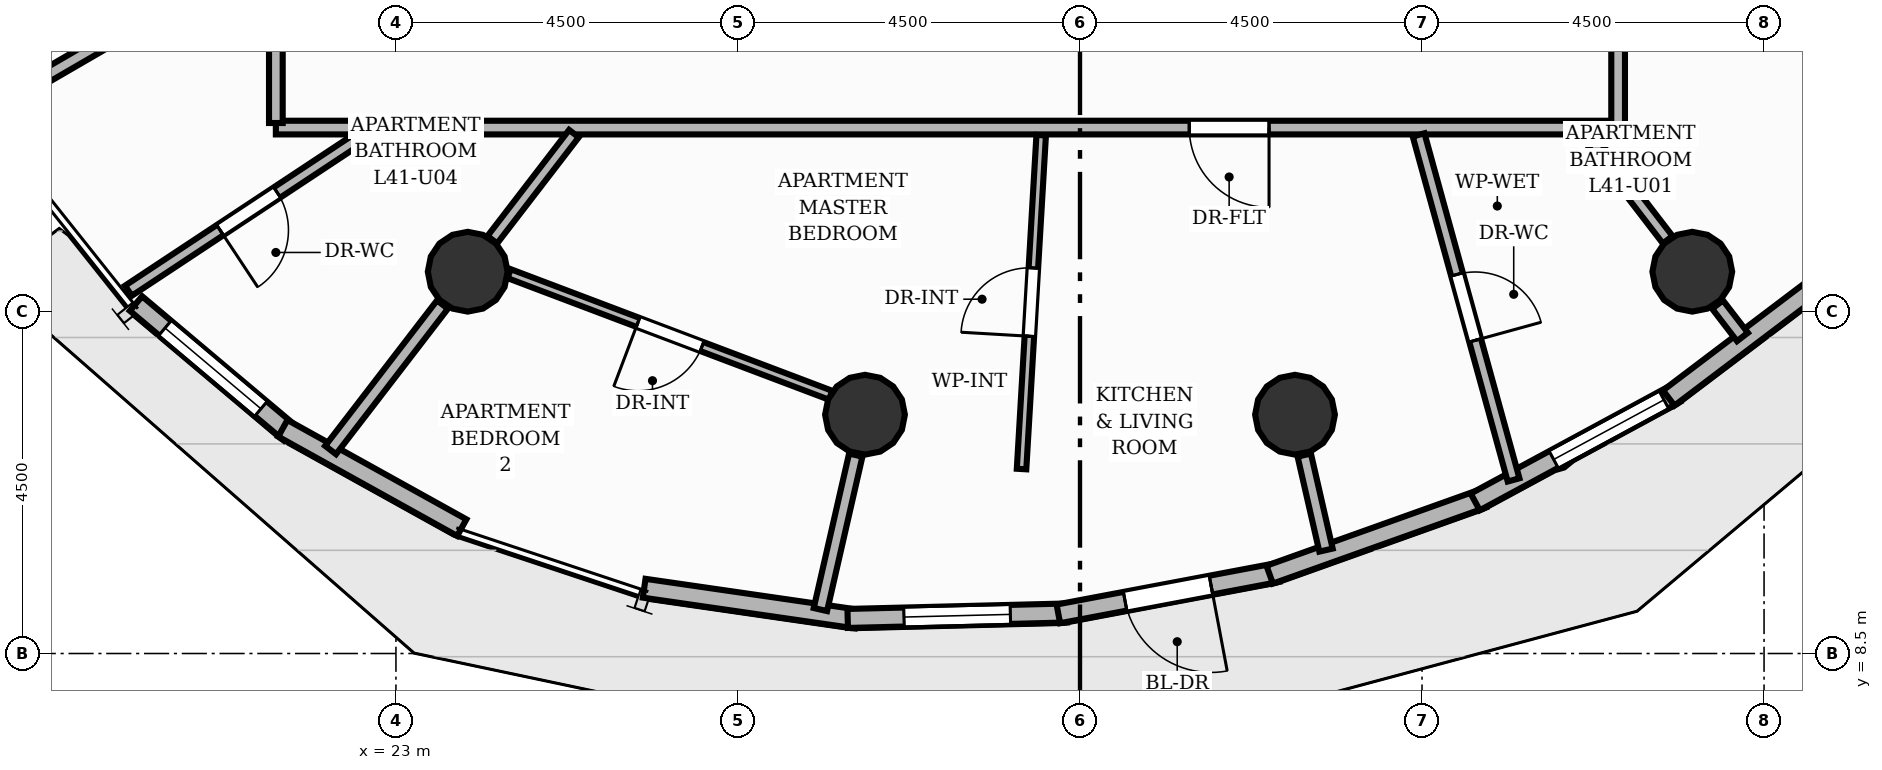
"""IFC4 building model, lengths in metres.
Left out: names, types, materials, properties, quantities, classifications, styles, units other than length and angle.
Written with IfcOpenShell. Run it as: python <this file> out.ifc"""

import sys

from ifc_helpers import new_model, si_unit, direction, frame, frame_2d, origin, origin_2d, place, context, subcontext, project, spatial, rectangle, circle, extrude, element, fill, save


model = new_model("IFC4")
c1 = context("Model", 3, precision=1e-05, world=origin(), true_north=direction((0.0, 1.0)))
c2 = subcontext(c1, "Body", "Model", "MODEL_VIEW")
j1 = project(units=[si_unit("LENGTHUNIT", "METRE"), si_unit("PLANEANGLEUNIT", "RADIAN")], contexts=[c1])
p1 = place(None, origin())
s1 = spatial("IfcSite", under=j1, at=p1, CompositionType="ELEMENT")
p2 = place(p1, origin())
s2 = spatial("IfcBuilding", under=s1, at=p2, CompositionType="ELEMENT")
p3 = place(p2, frame((0.0, 0.0, 139.36)))
s3 = spatial("IfcBuildingStorey", under=s2, at=p3, CompositionType="ELEMENT", Elevation=139.36)
for number, where, z_axis, x_axis in (
    (1, (23.944, 13.523, 0.0), (0.0, 0.0, 1.0), (1.0, 0.0, 0.0)),
    (2, (29.171, 11.642, 0.0), (0.0, 0.0, 1.0), (1.0, 0.0, 0.0)),
    (3, (34.829, 11.642, 0.0), (0.0, 0.0, 1.0), (1.0, 0.0, 0.0)),
    (4, (40.056, 13.523, 0.0), (0.0, 0.0, 1.0), (1.0, 0.0, 0.0)),
):
    element("IfcColumn", number, at=place(p3, frame(where, z_axis=z_axis, x_axis=x_axis)), inside=s3, PredefinedType="COLUMN", context=c2, shape_type="SweptSolid", body=[
        extrude(circle(Radius=0.525, at=origin_2d()), origin(), (0.0, 0.0, 1.0), 3.2),
    ])
p4 = place(p3, frame((21.605, 11.399, 0.0), z_axis=(0.0, 0.0, 1.0), x_axis=(-0.764825125467, 0.644237943197, 0.0)))
e5 = element("IfcWall", 5, at=p4, inside=s3, PredefinedType="SOLIDWALL", context=c2, shape_type="SweptSolid", body=[
    extrude(rectangle(XDim=2.648, YDim=0.25, at=frame_2d((1.324, 0.0))), origin(), (0.0, 0.0, 1.0), 2.96),
])
p5 = place(p4, frame((0.499, 0.0, 0.85)))
e6 = element("IfcOpeningElement", 6, at=p5, cuts=e5, PredefinedType="OPENING", context=c2, shape_type="SweptSolid", body=[
    extrude(rectangle(XDim=1.65, YDim=1.55, at=frame_2d((0.825, 0.775))), frame((0.0, 0.135, 0.0), z_axis=(0.0, -1.0, 0.0), x_axis=(1.0, 0.0, 0.0)), (0.0, 0.0, 1.0), 0.27),
])
p6 = place(p3, frame((23.866, 10.156, 0.0), z_axis=(0.0, 0.0, 1.0), x_axis=(-0.874341102682, 0.485311895755, 0.0)))
e7 = element("IfcWall", 7, at=p6, inside=s3, PredefinedType="SOLIDWALL", context=c2, shape_type="SweptSolid", body=[
    extrude(rectangle(XDim=2.693, YDim=0.25, at=frame_2d((1.346, 0.0))), origin(), (0.0, 0.0, 1.0), 2.96),
])
p7 = place(p3, frame((29.054, 8.955, 0.0), z_axis=(0.0, 0.0, 1.0), x_axis=(-0.98966505468, 0.143398324768, 0.0)))
e8 = element("IfcWall", 8, at=p7, inside=s3, PredefinedType="SOLIDWALL", context=c2, shape_type="SweptSolid", body=[
    extrude(rectangle(XDim=2.818, YDim=0.25, at=frame_2d((1.409, 0.0))), origin(), (0.0, 0.0, 1.0), 2.96),
])
p8 = place(p3, frame((31.824, 9.033, 0.0), z_axis=(0.0, 0.0, 1.0), x_axis=(-0.999687646408, -0.02499219116, 0.0)))
e9 = element("IfcWall", 9, at=p8, inside=s3, PredefinedType="SOLIDWALL", context=c2, shape_type="SweptSolid", body=[
    extrude(rectangle(XDim=2.882, YDim=0.25, at=frame_2d((1.441, 0.0))), origin(), (0.0, 0.0, 1.0), 2.96),
])
p9 = place(p8, frame((0.741, 0.0, 0.85)))
e10 = element("IfcOpeningElement", 10, at=p9, cuts=e9, PredefinedType="OPENING", context=c2, shape_type="SweptSolid", body=[
    extrude(rectangle(XDim=1.4, YDim=1.55, at=frame_2d((0.7, 0.775))), frame((0.0, 0.135, 0.0), z_axis=(0.0, -1.0, 0.0), x_axis=(1.0, 0.0, 0.0)), (0.0, 0.0, 1.0), 0.27),
])
p10 = place(p3, frame((34.601, 9.566, 0.0), z_axis=(0.0, 0.0, 1.0), x_axis=(-0.982637070109, -0.185538105108, 0.0)))
e11 = element("IfcWall", 11, at=p10, inside=s3, PredefinedType="SOLIDWALL", context=c2, shape_type="SweptSolid", body=[
    extrude(rectangle(XDim=2.937, YDim=0.25, at=frame_2d((1.469, 0.0))), origin(), (0.0, 0.0, 1.0), 2.96),
])
p11 = place(p10, frame((0.893, 0.0, 0.0)))
e12 = element("IfcOpeningElement", 12, at=p11, cuts=e11, PredefinedType="OPENING", context=c2, shape_type="SweptSolid", body=[
    extrude(rectangle(XDim=1.15, YDim=2.2, at=frame_2d((0.575, 1.1))), frame((0.0, 0.135, 0.0), z_axis=(0.0, -1.0, 0.0), x_axis=(1.0, 0.0, 0.0)), (0.0, 0.0, 1.0), 0.27),
])
p12 = place(p3, frame((37.299, 10.539, 0.0), z_axis=(0.0, 0.0, 1.0), x_axis=(-0.94175304307, -0.33630522724, 0.0)))
e13 = element("IfcWall", 13, at=p12, inside=s3, PredefinedType="SOLIDWALL", context=c2, shape_type="SweptSolid", body=[
    extrude(rectangle(XDim=2.977, YDim=0.25, at=frame_2d((1.489, 0.0))), origin(), (0.0, 0.0, 1.0), 2.96),
])
p13 = place(p3, frame((39.837, 11.921, 0.0), z_axis=(0.0, 0.0, 1.0), x_axis=(-0.879567466611, -0.475774181393, 0.0)))
e14 = element("IfcWall", 14, at=p13, inside=s3, PredefinedType="SOLIDWALL", context=c2, shape_type="SweptSolid", body=[
    extrude(rectangle(XDim=2.998, YDim=0.25, at=frame_2d((1.499, 0.0))), origin(), (0.0, 0.0, 1.0), 2.96),
])
p14 = place(p13, frame((0.175, 0.0, 0.85)))
e15 = element("IfcOpeningElement", 15, at=p14, cuts=e14, PredefinedType="OPENING", context=c2, shape_type="SweptSolid", body=[
    extrude(rectangle(XDim=1.65, YDim=1.55, at=frame_2d((0.825, 0.775))), frame((0.0, 0.135, 0.0), z_axis=(0.0, -1.0, 0.0), x_axis=(1.0, 0.0, 0.0)), (0.0, 0.0, 1.0), 0.27),
])
p15 = place(p3, frame((42.137, 13.671, 0.0), z_axis=(0.0, 0.0, 1.0), x_axis=(-0.797511213298, -0.603304122863, 0.0)))
e16 = element("IfcWall", 16, at=p15, inside=s3, PredefinedType="SOLIDWALL", context=c2, shape_type="SweptSolid", body=[
    extrude(rectangle(XDim=2.998, YDim=0.25, at=frame_2d((1.499, 0.0))), origin(), (0.0, 0.0, 1.0), 2.96),
])
p16 = place(p3, frame((19.472, 16.726, 0.0), z_axis=(0.0, 0.0, 1.0), x_axis=(-0.864844369658, -0.502040054448, 0.0)))
e17 = element("IfcWall", 17, at=p16, inside=s3, PredefinedType="PARTITIONING", context=c2, shape_type="SweptSolid", body=[
    extrude(rectangle(XDim=1.974, YDim=0.18, at=frame_2d((0.987, 0.0))), origin(), (0.0, 0.0, 1.0), 2.336),
])
p17 = place(p3, frame((23.612, 13.092, 0.0), z_axis=(0.0, 0.0, 1.0), x_axis=(-0.609549509747, -0.79274800231, 0.0)))
e18 = element("IfcWall", 18, at=p17, inside=s3, PredefinedType="PARTITIONING", context=c2, shape_type="SweptSolid", body=[
    extrude(rectangle(XDim=2.415, YDim=0.18, at=frame_2d((1.208, 0.0))), origin(), (0.0, 0.0, 1.0), 2.336),
])
p18 = place(p3, frame((29.05, 11.111, 0.0), z_axis=(0.0, 0.0, 1.0), x_axis=(-0.223063251486, -0.974803973031, 0.0)))
e19 = element("IfcWall", 19, at=p18, inside=s3, PredefinedType="PARTITIONING", context=c2, shape_type="SweptSolid", body=[
    extrude(rectangle(XDim=2.085, YDim=0.18, at=frame_2d((1.042, 0.0))), origin(), (0.0, 0.0, 1.0), 2.336),
])
p19 = place(p3, frame((34.95, 11.111, 0.0), z_axis=(0.0, 0.0, 1.0), x_axis=(0.223093561241, -0.974797036789, 0.0)))
e20 = element("IfcWall", 20, at=p19, inside=s3, PredefinedType="PARTITIONING", context=c2, shape_type="SweptSolid", body=[
    extrude(rectangle(XDim=1.282, YDim=0.18, at=frame_2d((0.641, 0.0))), origin(), (0.0, 0.0, 1.0), 2.336),
])
p20 = place(p3, frame((40.388, 13.092, 0.0), z_axis=(0.0, 0.0, 1.0), x_axis=(0.609469486836, -0.792809526063, 0.0)))
e21 = element("IfcWall", 21, at=p20, inside=s3, PredefinedType="PARTITIONING", context=c2, shape_type="SweptSolid", body=[
    extrude(rectangle(XDim=0.538, YDim=0.18, at=frame_2d((0.269, 0.0))), origin(), (0.0, 0.0, 1.0), 2.336),
])
p21 = place(p3, frame((39.08, 15.42, 0.0), z_axis=(0.0, 0.0, 1.0), x_axis=(-1.0, 0.0, 0.0)))
e22 = element("IfcWall", 22, at=p21, inside=s3, PredefinedType="PARTITIONING", context=c2, shape_type="SweptSolid", body=[
    extrude(rectangle(XDim=16.39, YDim=0.18, at=frame_2d((8.195, 0.0))), origin(), (0.0, 0.0, 1.0), 2.955),
])
p22 = place(p21, frame((4.593, 0.0, 0.0)))
e23 = element("IfcOpeningElement", 23, at=p22, cuts=e22, PredefinedType="OPENING", context=c2, shape_type="SweptSolid", body=[
    extrude(rectangle(XDim=1.05, YDim=2.15, at=frame_2d((0.525, 1.075))), frame((0.0, 0.1, 0.0), z_axis=(0.0, -1.0, 0.0), x_axis=(1.0, 0.0, 0.0)), (0.0, 0.0, 1.0), 0.2),
])
p23 = place(p3, frame((39.08, 32.58, 0.0), z_axis=(0.0, 0.0, 1.0), x_axis=(0.0, -1.0, 0.0)))
e24 = element("IfcWall", 24, at=p23, inside=s3, PredefinedType="PARTITIONING", context=c2, shape_type="SweptSolid", body=[
    extrude(rectangle(XDim=17.16, YDim=0.18, at=frame_2d((8.58, 0.0))), origin(), (0.0, 0.0, 1.0), 2.955),
])
p24 = place(p23, frame((9.64, 0.0, 0.0)))
e25 = element("IfcOpeningElement", 25, at=p24, cuts=e24, PredefinedType="OPENING", context=c2, shape_type="SweptSolid", body=[
    extrude(rectangle(XDim=1.05, YDim=2.15, at=frame_2d((0.525, 1.075))), frame((0.0, 0.1, 0.0), z_axis=(0.0, -1.0, 0.0), x_axis=(1.0, 0.0, 0.0)), (0.0, 0.0, 1.0), 0.2),
])
p25 = place(p3, frame((22.746, 15.42, 0.0), z_axis=(0.0, 0.0, 1.0), x_axis=(-1.0, 0.0, 0.0)))
e26 = element("IfcWall", 26, at=p25, inside=s3, PredefinedType="PARTITIONING", context=c2, shape_type="SweptSolid", body=[
    extrude(rectangle(XDim=1.326, YDim=0.18, at=frame_2d((0.663, 0.0))), origin(), (0.0, 0.0, 1.0), 2.955),
])
p26 = place(p3, frame((21.42, 15.48, 0.0), z_axis=(0.0, 0.0, 1.0), x_axis=(0.0, 1.0, 0.0)))
e27 = element("IfcWall", 27, at=p26, inside=s3, PredefinedType="PARTITIONING", context=c2, shape_type="SweptSolid", body=[
    extrude(rectangle(XDim=6.12, YDim=0.18, at=frame_2d((3.06, 0.0))), origin(), (0.0, 0.0, 1.0), 2.955),
])
p27 = place(p26, frame((2.167, 0.0, 0.0)))
e28 = element("IfcOpeningElement", 28, at=p27, cuts=e27, PredefinedType="OPENING", context=c2, shape_type="SweptSolid", body=[
    extrude(rectangle(XDim=1.05, YDim=2.15, at=frame_2d((0.525, 1.075))), frame((0.0, 0.1, 0.0), z_axis=(0.0, -1.0, 0.0), x_axis=(1.0, 0.0, 0.0)), (0.0, 0.0, 1.0), 0.2),
])
p28 = place(p3, frame((36.455, 15.323, 0.0), z_axis=(0.0, 0.0, 1.0), x_axis=(0.265393905211, -0.964140070258, 0.0)))
e29 = element("IfcWall", 29, at=p28, inside=s3, PredefinedType="PLUMBINGWALL", context=c2, shape_type="SweptSolid", body=[
    extrude(rectangle(XDim=4.708, YDim=0.16, at=frame_2d((2.354, 0.0))), origin(), (0.0, 0.0, 1.0), 2.955),
])
p29 = place(p28, frame((1.904, 0.0, 0.0)))
e30 = element("IfcOpeningElement", 30, at=p29, cuts=e29, PredefinedType="OPENING", context=c2, shape_type="SweptSolid", body=[
    extrude(rectangle(XDim=0.9, YDim=2.1, at=frame_2d((0.45, 1.05))), frame((0.0, 0.09, 0.0), z_axis=(0.0, -1.0, 0.0), x_axis=(1.0, 0.0, 0.0)), (0.0, 0.0, 1.0), 0.18),
])
p30 = place(p3, frame((31.231, 10.927, 0.0), z_axis=(0.0, 0.0, 1.0), x_axis=(0.058751291398, 0.998272651012, 0.0)))
e31 = element("IfcWall", 31, at=p30, inside=s3, PredefinedType="PARTITIONING", context=c2, shape_type="SweptSolid", body=[
    extrude(rectangle(XDim=4.401, YDim=0.125, at=frame_2d((2.2, 0.0))), origin(), (0.0, 0.0, 1.0), 2.692),
])
p31 = place(p30, frame((1.75, 0.0, 0.0)))
e32 = element("IfcOpeningElement", 32, at=p31, cuts=e31, PredefinedType="OPENING", context=c2, shape_type="SweptSolid", body=[
    extrude(rectangle(XDim=0.9, YDim=2.1, at=frame_2d((0.45, 1.05))), frame((0.0, 0.073, 0.0), z_axis=(0.0, -1.0, 0.0), x_axis=(1.0, 0.0, 0.0)), (0.0, 0.0, 1.0), 0.145),
])
p32 = place(p3, frame((38.658, 15.341, 0.0), z_axis=(0.0, 0.0, 1.0), x_axis=(0.609536601946, -0.792757927042, 0.0)))
e33 = element("IfcWall", 33, at=p32, inside=s3, PredefinedType="PLUMBINGWALL", context=c2, shape_type="SweptSolid", body=[
    extrude(rectangle(XDim=1.761, YDim=0.16, at=frame_2d((0.881, 0.0))), origin(), (0.0, 0.0, 1.0), 2.336),
])
p33 = place(p3, frame((28.722, 11.897, 0.0), z_axis=(0.0, 0.0, 1.0), x_axis=(-0.935309901838, 0.353829602385, 0.0)))
e34 = element("IfcWall", 34, at=p33, inside=s3, PredefinedType="PARTITIONING", context=c2, shape_type="SweptSolid", body=[
    extrude(rectangle(XDim=4.526, YDim=0.125, at=frame_2d((2.263, 0.0))), origin(), (0.0, 0.0, 1.0), 2.411),
])
p34 = place(p33, frame((1.813, 0.0, 0.0)))
e35 = element("IfcOpeningElement", 35, at=p34, cuts=e34, PredefinedType="OPENING", context=c2, shape_type="SweptSolid", body=[
    extrude(rectangle(XDim=0.9, YDim=2.1, at=frame_2d((0.45, 1.05))), frame((0.0, 0.073, 0.0), z_axis=(0.0, -1.0, 0.0), x_axis=(1.0, 0.0, 0.0)), (0.0, 0.0, 1.0), 0.145),
])
p35 = place(p3, frame((24.268, 13.944, 0.0), z_axis=(0.0, 0.0, 1.0), x_axis=(0.609536601946, 0.792757927042, 0.0)))
e36 = element("IfcWall", 36, at=p35, inside=s3, PredefinedType="PLUMBINGWALL", context=c2, shape_type="SweptSolid", body=[
    extrude(rectangle(XDim=1.761, YDim=0.16, at=frame_2d((0.881, 0.0))), origin(), (0.0, 0.0, 1.0), 2.336),
])
p36 = place(p3, frame((22.643, 15.365, 0.0), z_axis=(0.0, 0.0, 1.0), x_axis=(-0.83413433024, -0.551561346647, 0.0)))
e37 = element("IfcWall", 37, at=p36, inside=s3, PredefinedType="PLUMBINGWALL", context=c2, shape_type="SweptSolid", body=[
    extrude(rectangle(XDim=3.792, YDim=0.16, at=frame_2d((1.896, 0.0))), origin(), (0.0, 0.0, 1.0), 2.955),
])
p37 = place(p36, frame((1.446, 0.0, 0.0)))
e38 = element("IfcOpeningElement", 38, at=p37, cuts=e37, PredefinedType="OPENING", context=c2, shape_type="SweptSolid", body=[
    extrude(rectangle(XDim=0.9, YDim=2.1, at=frame_2d((0.45, 1.05))), frame((0.0, 0.09, 0.0), z_axis=(0.0, -1.0, 0.0), x_axis=(1.0, 0.0, 0.0)), (0.0, 0.0, 1.0), 0.18),
])
p38 = place(p11, origin())
e39 = element("IfcDoor", 39, at=p38, inside=s3, OperationType="SINGLE_SWING_LEFT", PredefinedType="DOOR", context=c2, shape_type="SweptSolid", body=[
    extrude(rectangle(XDim=1.15, YDim=2.2, at=frame_2d((0.575, 1.1))), frame((0.0, 0.025, 0.0), z_axis=(0.0, -1.0, 0.0), x_axis=(1.0, 0.0, 0.0)), (0.0, 0.0, 1.0), 0.05),
])
fill(e12, e39)
p39 = place(p5, origin())
e40 = element("IfcWindow", 40, at=p39, inside=s3, PartitioningType="SINGLE_PANEL", PredefinedType="WINDOW", context=c2, shape_type="SweptSolid", body=[
    extrude(rectangle(XDim=1.65, YDim=1.55, at=frame_2d((0.825, 0.775))), frame((0.0, 0.03, 0.0), z_axis=(0.0, -1.0, 0.0), x_axis=(1.0, 0.0, 0.0)), (0.0, 0.0, 1.0), 0.06),
])
fill(e6, e40)
p40 = place(p9, origin())
e41 = element("IfcWindow", 41, at=p40, inside=s3, PartitioningType="SINGLE_PANEL", PredefinedType="WINDOW", context=c2, shape_type="SweptSolid", body=[
    extrude(rectangle(XDim=1.4, YDim=1.55, at=frame_2d((0.7, 0.775))), frame((0.0, 0.03, 0.0), z_axis=(0.0, -1.0, 0.0), x_axis=(1.0, 0.0, 0.0)), (0.0, 0.0, 1.0), 0.06),
])
fill(e10, e41)
p41 = place(p14, origin())
e42 = element("IfcWindow", 42, at=p41, inside=s3, PartitioningType="SINGLE_PANEL", PredefinedType="WINDOW", context=c2, shape_type="SweptSolid", body=[
    extrude(rectangle(XDim=1.65, YDim=1.55, at=frame_2d((0.825, 0.775))), frame((0.0, 0.03, 0.0), z_axis=(0.0, -1.0, 0.0), x_axis=(1.0, 0.0, 0.0)), (0.0, 0.0, 1.0), 0.06),
])
fill(e15, e42)
p42 = place(p22, origin())
e43 = element("IfcDoor", 43, at=p42, inside=s3, OperationType="SINGLE_SWING_LEFT", PredefinedType="DOOR", context=c2, shape_type="SweptSolid", body=[
    extrude(rectangle(XDim=1.05, YDim=2.15, at=frame_2d((0.525, 1.075))), frame((0.0, 0.025, 0.0), z_axis=(0.0, -1.0, 0.0), x_axis=(1.0, 0.0, 0.0)), (0.0, 0.0, 1.0), 0.05),
])
fill(e23, e43)
p43 = place(p29, origin())
e44 = element("IfcDoor", 44, at=p43, inside=s3, OperationType="SINGLE_SWING_RIGHT", PredefinedType="DOOR", context=c2, shape_type="SweptSolid", body=[
    extrude(rectangle(XDim=0.9, YDim=2.1, at=frame_2d((0.45, 1.05))), frame((0.0, 0.025, 0.0), z_axis=(0.0, -1.0, 0.0), x_axis=(1.0, 0.0, 0.0)), (0.0, 0.0, 1.0), 0.05),
])
fill(e30, e44)
p44 = place(p31, origin())
e45 = element("IfcDoor", 45, at=p44, inside=s3, OperationType="SINGLE_SWING_LEFT", PredefinedType="DOOR", context=c2, shape_type="SweptSolid", body=[
    extrude(rectangle(XDim=0.9, YDim=2.1, at=frame_2d((0.45, 1.05))), frame((0.0, 0.025, 0.0), z_axis=(0.0, -1.0, 0.0), x_axis=(1.0, 0.0, 0.0)), (0.0, 0.0, 1.0), 0.05),
])
fill(e32, e45)
p45 = place(p34, origin())
e46 = element("IfcDoor", 46, at=p45, inside=s3, OperationType="SINGLE_SWING_RIGHT", PredefinedType="DOOR", context=c2, shape_type="SweptSolid", body=[
    extrude(rectangle(XDim=0.9, YDim=2.1, at=frame_2d((0.45, 1.05))), frame((0.0, 0.025, 0.0), z_axis=(0.0, -1.0, 0.0), x_axis=(1.0, 0.0, 0.0)), (0.0, 0.0, 1.0), 0.05),
])
fill(e35, e46)
p46 = place(p37, origin())
e47 = element("IfcDoor", 47, at=p46, inside=s3, OperationType="SINGLE_SWING_RIGHT", PredefinedType="DOOR", context=c2, shape_type="SweptSolid", body=[
    extrude(rectangle(XDim=0.9, YDim=2.1, at=frame_2d((0.45, 1.05))), frame((0.0, 0.025, 0.0), z_axis=(0.0, -1.0, 0.0), x_axis=(1.0, 0.0, 0.0)), (0.0, 0.0, 1.0), 0.05),
])
fill(e38, e47)
save(model, sys.argv[1])
